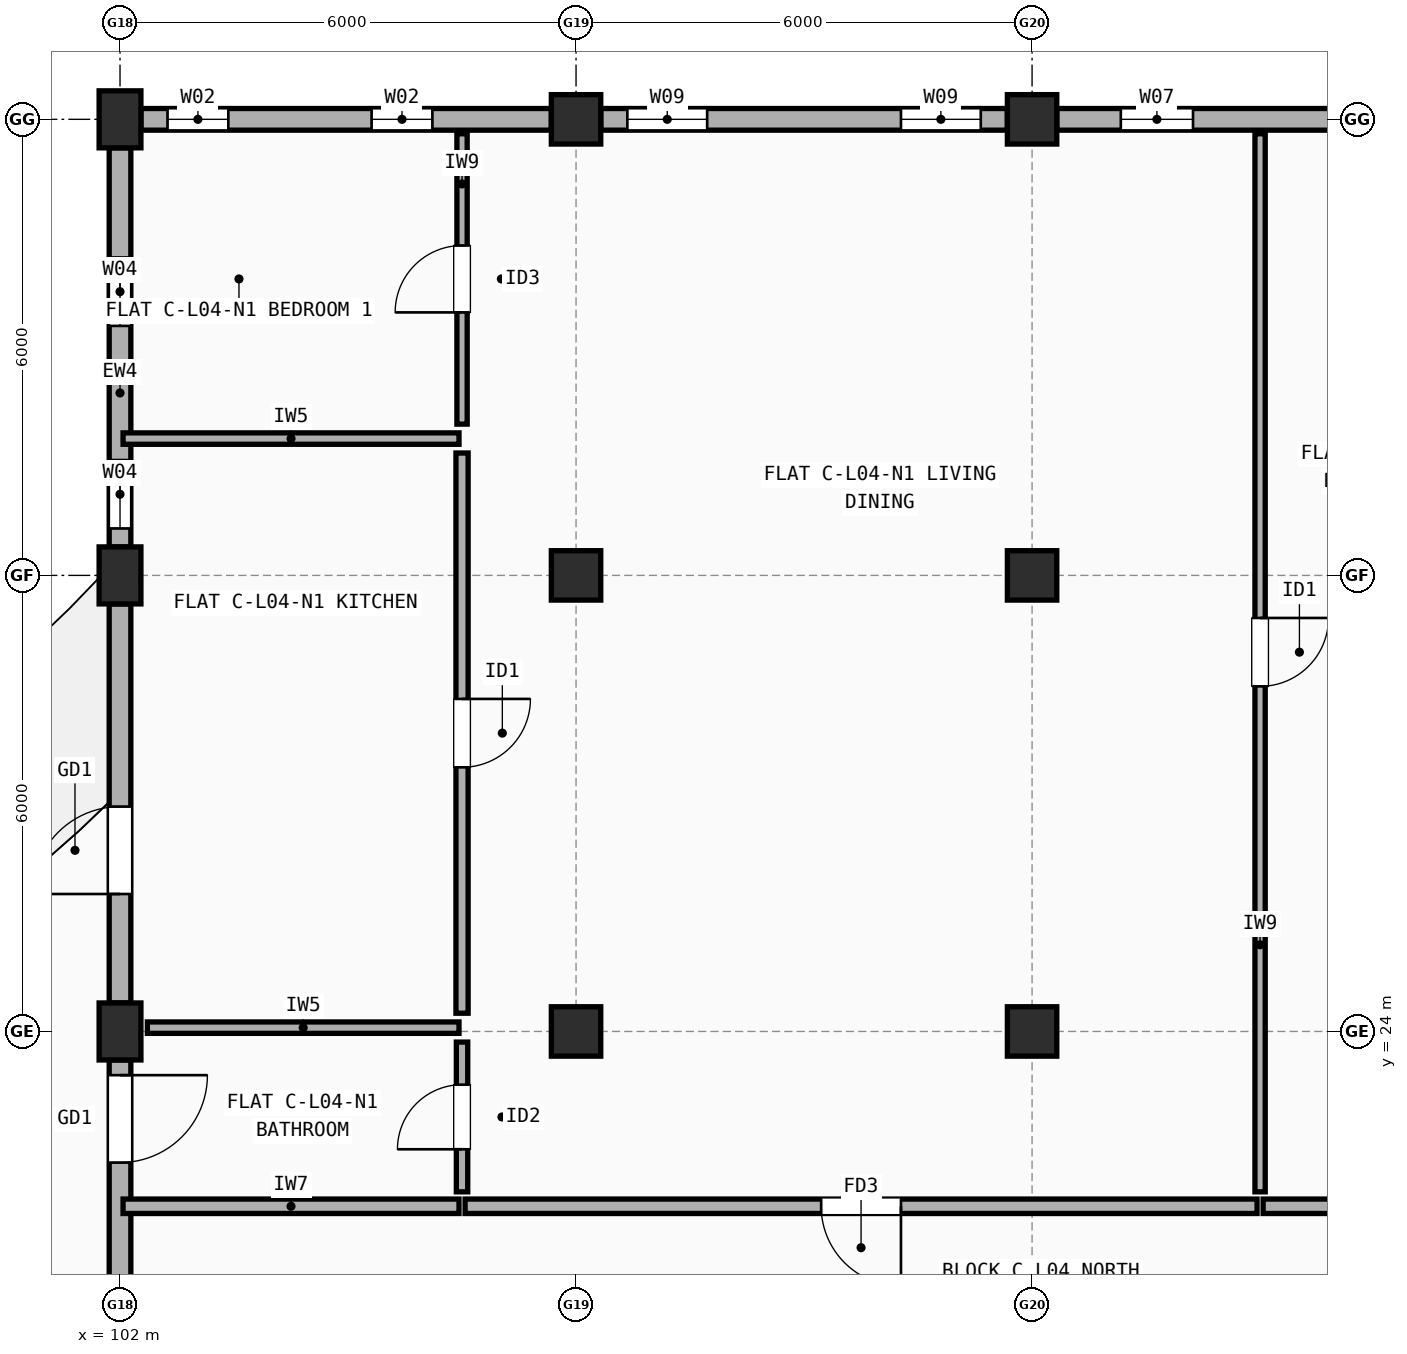
"""IFC4 building model, lengths in metres.
Left out: names, types, materials, properties, quantities, classifications, styles, units other than length and angle.
Written with IfcOpenShell. Run it as: python <this file> out.ifc"""

import sys

from ifc_helpers import new_model, si_unit, direction, frame, frame_2d, origin, origin_2d, place, context, subcontext, project, spatial, rectangle, extrude, element, fill, save


model = new_model("IFC4")
c1 = context("Model", 3, precision=1e-05, world=origin(), true_north=direction((0.0, 1.0)))
c2 = subcontext(c1, "Body", "Model", "MODEL_VIEW")
j1 = project(units=[si_unit("LENGTHUNIT", "METRE"), si_unit("PLANEANGLEUNIT", "RADIAN")], contexts=[c1])
p1 = place(None, origin())
s1 = spatial("IfcSite", under=j1, at=p1, CompositionType="ELEMENT")
p2 = place(p1, origin())
s2 = spatial("IfcBuilding", under=s1, at=p2, CompositionType="ELEMENT")
p3 = place(p2, frame((0.0, 0.0, 14.1)))
s3 = spatial("IfcBuildingStorey", under=s2, at=p3, CompositionType="ELEMENT", Elevation=14.1)
for number, where, z_axis, x_axis in (
    (1, (102.0, 24.0, 0.0), (0.0, 0.0, 1.0), (1.0, 0.0, 0.0)),
    (2, (102.0, 30.0, 0.0), (0.0, 0.0, 1.0), (1.0, 0.0, 0.0)),
    (3, (102.0, 36.0, 0.0), (0.0, 0.0, 1.0), (1.0, 0.0, 0.0)),
):
    element("IfcColumn", number, at=place(p3, frame(where, z_axis=z_axis, x_axis=x_axis)), inside=s3, PredefinedType="COLUMN", context=c2, shape_type="SweptSolid", body=[
        extrude(rectangle(XDim=0.55, YDim=0.75, at=origin_2d()), origin(), (0.0, 0.0, 1.0), 2.95),
    ])
for number, where, z_axis, x_axis in (
    (4, (108.0, 24.0, 0.0), (0.0, 0.0, 1.0), (1.0, 0.0, 0.0)),
    (5, (108.0, 30.0, 0.0), (0.0, 0.0, 1.0), (1.0, 0.0, 0.0)),
    (6, (108.0, 36.0, 0.0), (0.0, 0.0, 1.0), (1.0, 0.0, 0.0)),
    (7, (114.0, 24.0, 0.0), (0.0, 0.0, 1.0), (1.0, 0.0, 0.0)),
    (8, (114.0, 30.0, 0.0), (0.0, 0.0, 1.0), (1.0, 0.0, 0.0)),
    (9, (114.0, 36.0, 0.0), (0.0, 0.0, 1.0), (1.0, 0.0, 0.0)),
):
    element("IfcColumn", number, at=place(p3, frame(where, z_axis=z_axis, x_axis=x_axis)), inside=s3, PredefinedType="COLUMN", context=c2, shape_type="SweptSolid", body=[
        extrude(rectangle(XDim=0.65, YDim=0.65, at=origin_2d()), origin(), (0.0, 0.0, 1.0), 2.95),
    ])
p4 = place(p3, frame((119.675, 36.0, 0.0), z_axis=(0.0, 0.0, 1.0), x_axis=(-1.0, 0.0, 0.0)))
e10 = element("IfcWall", 10, at=p4, inside=s3, PredefinedType="STANDARD", context=c2, shape_type="SweptSolid", body=[
    extrude(rectangle(XDim=5.35, YDim=0.285, at=frame_2d((2.675, 0.0))), origin(), (0.0, 0.0, 1.0), 2.432),
])
p5 = place(p4, frame((0.867, 0.0, 0.9)))
e11 = element("IfcOpeningElement", 11, at=p5, cuts=e10, PredefinedType="OPENING", context=c2, shape_type="SweptSolid", body=[
    extrude(rectangle(XDim=0.9, YDim=1.3, at=frame_2d((0.45, 0.65))), frame((0.0, 0.152, 0.0), z_axis=(0.0, -1.0, 0.0), x_axis=(1.0, 0.0, 0.0)), (0.0, 0.0, 1.0), 0.305),
])
p6 = place(p4, frame((3.558, 0.0, 0.9)))
e12 = element("IfcOpeningElement", 12, at=p6, cuts=e10, PredefinedType="OPENING", context=c2, shape_type="SweptSolid", body=[
    extrude(rectangle(XDim=0.95, YDim=1.35, at=frame_2d((0.475, 0.675))), frame((0.0, 0.152, 0.0), z_axis=(0.0, -1.0, 0.0), x_axis=(1.0, 0.0, 0.0)), (0.0, 0.0, 1.0), 0.305),
])
p7 = place(p3, frame((113.675, 36.0, 0.0), z_axis=(0.0, 0.0, 1.0), x_axis=(-1.0, 0.0, 0.0)))
e13 = element("IfcWall", 13, at=p7, inside=s3, PredefinedType="STANDARD", context=c2, shape_type="SweptSolid", body=[
    extrude(rectangle(XDim=5.35, YDim=0.285, at=frame_2d((2.675, 0.0))), origin(), (0.0, 0.0, 1.0), 2.432),
])
p8 = place(p7, frame((0.35, 0.0, 0.9)))
e14 = element("IfcOpeningElement", 14, at=p8, cuts=e13, PredefinedType="OPENING", context=c2, shape_type="SweptSolid", body=[
    extrude(rectangle(XDim=1.05, YDim=1.35, at=frame_2d((0.525, 0.675))), frame((0.0, 0.152, 0.0), z_axis=(0.0, -1.0, 0.0), x_axis=(1.0, 0.0, 0.0)), (0.0, 0.0, 1.0), 0.305),
])
p9 = place(p7, frame((3.95, 0.0, 0.9)))
e15 = element("IfcOpeningElement", 15, at=p9, cuts=e13, PredefinedType="OPENING", context=c2, shape_type="SweptSolid", body=[
    extrude(rectangle(XDim=1.05, YDim=1.35, at=frame_2d((0.525, 0.675))), frame((0.0, 0.152, 0.0), z_axis=(0.0, -1.0, 0.0), x_axis=(1.0, 0.0, 0.0)), (0.0, 0.0, 1.0), 0.305),
])
p10 = place(p3, frame((107.675, 36.0, 0.0), z_axis=(0.0, 0.0, 1.0), x_axis=(-1.0, 0.0, 0.0)))
e16 = element("IfcWall", 16, at=p10, inside=s3, PredefinedType="STANDARD", context=c2, shape_type="SweptSolid", body=[
    extrude(rectangle(XDim=5.4, YDim=0.285, at=frame_2d((2.7, 0.0))), origin(), (0.0, 0.0, 1.0), 2.432),
])
p11 = place(p10, frame((1.565, 0.0, 0.9)))
e17 = element("IfcOpeningElement", 17, at=p11, cuts=e16, PredefinedType="OPENING", context=c2, shape_type="SweptSolid", body=[
    extrude(rectangle(XDim=0.8, YDim=1.2, at=frame_2d((0.4, 0.6))), frame((0.0, 0.152, 0.0), z_axis=(0.0, -1.0, 0.0), x_axis=(1.0, 0.0, 0.0)), (0.0, 0.0, 1.0), 0.305),
])
p12 = place(p10, frame((4.25, 0.0, 0.9)))
e18 = element("IfcOpeningElement", 18, at=p12, cuts=e16, PredefinedType="OPENING", context=c2, shape_type="SweptSolid", body=[
    extrude(rectangle(XDim=0.8, YDim=1.2, at=frame_2d((0.4, 0.6))), frame((0.0, 0.152, 0.0), z_axis=(0.0, -1.0, 0.0), x_axis=(1.0, 0.0, 0.0)), (0.0, 0.0, 1.0), 0.305),
])
p13 = place(p3, frame((102.0, 35.625, 0.0), z_axis=(0.0, 0.0, 1.0), x_axis=(0.0, -1.0, 0.0)))
e19 = element("IfcWall", 19, at=p13, inside=s3, PredefinedType="STANDARD", context=c2, shape_type="SweptSolid", body=[
    extrude(rectangle(XDim=5.25, YDim=0.285, at=frame_2d((2.625, 0.0))), origin(), (0.0, 0.0, 1.0), 2.432),
])
p14 = place(p13, frame((1.442, 0.0, 0.9)))
e20 = element("IfcOpeningElement", 20, at=p14, cuts=e19, PredefinedType="OPENING", context=c2, shape_type="SweptSolid", body=[
    extrude(rectangle(XDim=0.9, YDim=1.3, at=frame_2d((0.45, 0.65))), frame((0.0, 0.152, 0.0), z_axis=(0.0, -1.0, 0.0), x_axis=(1.0, 0.0, 0.0)), (0.0, 0.0, 1.0), 0.305),
])
p15 = place(p13, frame((4.107, 0.0, 0.9)))
e21 = element("IfcOpeningElement", 21, at=p15, cuts=e19, PredefinedType="OPENING", context=c2, shape_type="SweptSolid", body=[
    extrude(rectangle(XDim=0.9, YDim=1.3, at=frame_2d((0.45, 0.65))), frame((0.0, 0.152, 0.0), z_axis=(0.0, -1.0, 0.0), x_axis=(1.0, 0.0, 0.0)), (0.0, 0.0, 1.0), 0.305),
])
p16 = place(p3, frame((102.0, 29.625, 0.0), z_axis=(0.0, 0.0, 1.0), x_axis=(0.0, -1.0, 0.0)))
e22 = element("IfcWall", 22, at=p16, inside=s3, PredefinedType="STANDARD", context=c2, shape_type="SweptSolid", body=[
    extrude(rectangle(XDim=5.25, YDim=0.285, at=frame_2d((2.625, 0.0))), origin(), (0.0, 0.0, 1.0), 2.432),
])
p17 = place(p16, frame((2.667, 0.0, 0.0)))
e23 = element("IfcOpeningElement", 23, at=p17, cuts=e22, PredefinedType="OPENING", context=c2, shape_type="SweptSolid", body=[
    extrude(rectangle(XDim=1.15, YDim=2.15, at=frame_2d((0.575, 1.075))), frame((0.0, 0.152, 0.0), z_axis=(0.0, -1.0, 0.0), x_axis=(1.0, 0.0, 0.0)), (0.0, 0.0, 1.0), 0.305),
])
p18 = place(p3, frame((102.0, 23.625, 0.0), z_axis=(0.0, 0.0, 1.0), x_axis=(0.0, -1.0, 0.0)))
e24 = element("IfcWall", 24, at=p18, inside=s3, PredefinedType="STANDARD", context=c2, shape_type="SweptSolid", body=[
    extrude(rectangle(XDim=5.25, YDim=0.285, at=frame_2d((2.625, 0.0))), origin(), (0.0, 0.0, 1.0), 2.432),
])
p19 = place(p18, frame((0.2, 0.0, 0.0)))
e25 = element("IfcOpeningElement", 25, at=p19, cuts=e24, PredefinedType="OPENING", context=c2, shape_type="SweptSolid", body=[
    extrude(rectangle(XDim=1.15, YDim=2.15, at=frame_2d((0.575, 1.075))), frame((0.0, 0.152, 0.0), z_axis=(0.0, -1.0, 0.0), x_axis=(1.0, 0.0, 0.0)), (0.0, 0.0, 1.0), 0.305),
])
p20 = place(p18, frame((3.083, 0.0, 0.9)))
e26 = element("IfcOpeningElement", 26, at=p20, cuts=e24, PredefinedType="OPENING", context=c2, shape_type="SweptSolid", body=[
    extrude(rectangle(XDim=1.05, YDim=1.35, at=frame_2d((0.525, 0.675))), frame((0.0, 0.152, 0.0), z_axis=(0.0, -1.0, 0.0), x_axis=(1.0, 0.0, 0.0)), (0.0, 0.0, 1.0), 0.305),
])
p21 = place(p3, frame((102.04, 21.7, 0.0), z_axis=(0.0, 0.0, 1.0), x_axis=(1.0, 0.0, 0.0)))
e27 = element("IfcWall", 27, at=p21, inside=s3, PredefinedType="SOLIDWALL", context=c2, shape_type="SweptSolid", body=[
    extrude(rectangle(XDim=4.42, YDim=0.19, at=frame_2d((2.21, 0.0))), origin(), (0.0, 0.0, 1.0), 2.432),
])
p22 = place(p3, frame((106.54, 21.7, 0.0), z_axis=(0.0, 0.0, 1.0), x_axis=(1.0, 0.0, 0.0)))
e28 = element("IfcWall", 28, at=p22, inside=s3, PredefinedType="SOLIDWALL", context=c2, shape_type="SweptSolid", body=[
    extrude(rectangle(XDim=10.42, YDim=0.19, at=frame_2d((5.21, 0.0))), origin(), (0.0, 0.0, 1.0), 2.508),
])
p23 = place(p22, frame((4.685, 0.0, 0.0)))
e29 = element("IfcOpeningElement", 29, at=p23, cuts=e28, PredefinedType="OPENING", context=c2, shape_type="SweptSolid", body=[
    extrude(rectangle(XDim=1.05, YDim=2.15, at=frame_2d((0.525, 1.075))), frame((0.0, 0.105, 0.0), z_axis=(0.0, -1.0, 0.0), x_axis=(1.0, 0.0, 0.0)), (0.0, 0.0, 1.0), 0.21),
])
p24 = place(p3, frame((106.5, 31.99, 0.0), z_axis=(0.0, 0.0, 1.0), x_axis=(0.0, 1.0, 0.0)))
e30 = element("IfcWall", 30, at=p24, inside=s3, PredefinedType="PARTITIONING", context=c2, shape_type="SweptSolid", body=[
    extrude(rectangle(XDim=3.82, YDim=0.135, at=frame_2d((1.91, 0.0))), origin(), (0.0, 0.0, 1.0), 2.95),
])
p25 = place(p24, frame((1.47, 0.0, 0.0)))
e31 = element("IfcOpeningElement", 31, at=p25, cuts=e30, PredefinedType="OPENING", context=c2, shape_type="SweptSolid", body=[
    extrude(rectangle(XDim=0.88, YDim=2.1, at=frame_2d((0.44, 1.05))), frame((0.0, 0.077, 0.0), z_axis=(0.0, -1.0, 0.0), x_axis=(1.0, 0.0, 0.0)), (0.0, 0.0, 1.0), 0.155),
])
p26 = place(p3, frame((106.5, 24.24, 0.0), z_axis=(0.0, 0.0, 1.0), x_axis=(0.0, 1.0, 0.0)))
e32 = element("IfcWall", 32, at=p26, inside=s3, PredefinedType="PLUMBINGWALL", context=c2, shape_type="SweptSolid", body=[
    extrude(rectangle(XDim=7.37, YDim=0.16, at=frame_2d((3.685, 0.0))), origin(), (0.0, 0.0, 1.0), 2.432),
])
p27 = place(p26, frame((3.235, 0.0, 0.0)))
e33 = element("IfcOpeningElement", 33, at=p27, cuts=e32, PredefinedType="OPENING", context=c2, shape_type="SweptSolid", body=[
    extrude(rectangle(XDim=0.9, YDim=2.1, at=frame_2d((0.45, 1.05))), frame((0.0, 0.09, 0.0), z_axis=(0.0, -1.0, 0.0), x_axis=(1.0, 0.0, 0.0)), (0.0, 0.0, 1.0), 0.18),
])
p28 = place(p3, frame((106.5, 21.89, 0.0), z_axis=(0.0, 0.0, 1.0), x_axis=(0.0, 1.0, 0.0)))
e34 = element("IfcWall", 34, at=p28, inside=s3, PredefinedType="PARTITIONING", context=c2, shape_type="SweptSolid", body=[
    extrude(rectangle(XDim=1.97, YDim=0.15, at=frame_2d((0.985, 0.0))), origin(), (0.0, 0.0, 1.0), 2.95),
])
p29 = place(p28, frame((0.56, 0.0, 0.0)))
e35 = element("IfcOpeningElement", 35, at=p29, cuts=e34, PredefinedType="OPENING", context=c2, shape_type="SweptSolid", body=[
    extrude(rectangle(XDim=0.85, YDim=2.1, at=frame_2d((0.425, 1.05))), frame((0.0, 0.085, 0.0), z_axis=(0.0, -1.0, 0.0), x_axis=(1.0, 0.0, 0.0)), (0.0, 0.0, 1.0), 0.17),
])
p30 = place(p3, frame((102.04, 31.8, 0.0), z_axis=(0.0, 0.0, 1.0), x_axis=(1.0, 0.0, 0.0)))
e36 = element("IfcWall", 36, at=p30, inside=s3, PredefinedType="PARTITIONING", context=c2, shape_type="SweptSolid", body=[
    extrude(rectangle(XDim=4.42, YDim=0.15, at=frame_2d((2.21, 0.0))), origin(), (0.0, 0.0, 1.0), 2.432),
])
p31 = place(p3, frame((102.36, 24.05, 0.0), z_axis=(0.0, 0.0, 1.0), x_axis=(1.0, 0.0, 0.0)))
e37 = element("IfcWall", 37, at=p31, inside=s3, PredefinedType="PARTITIONING", context=c2, shape_type="SweptSolid", body=[
    extrude(rectangle(XDim=4.1, YDim=0.15, at=frame_2d((2.05, 0.0))), origin(), (0.0, 0.0, 1.0), 2.508),
])
p32 = place(p3, frame((117.04, 21.7, 0.0), z_axis=(0.0, 0.0, 1.0), x_axis=(1.0, 0.0, 0.0)))
e38 = element("IfcWall", 38, at=p32, inside=s3, PredefinedType="SOLIDWALL", context=c2, shape_type="SweptSolid", body=[
    extrude(rectangle(XDim=2.92, YDim=0.19, at=frame_2d((1.46, 0.0))), origin(), (0.0, 0.0, 1.0), 2.95),
])
p33 = place(p3, frame((117.0, 21.89, 0.0), z_axis=(0.0, 0.0, 1.0), x_axis=(0.0, 1.0, 0.0)))
e39 = element("IfcWall", 39, at=p33, inside=s3, PredefinedType="PARTITIONING", context=c2, shape_type="SweptSolid", body=[
    extrude(rectangle(XDim=13.92, YDim=0.135, at=frame_2d((6.96, 0.0))), origin(), (0.0, 0.0, 1.0), 2.432),
])
p34 = place(p33, frame((6.65, 0.0, 0.0)))
e40 = element("IfcOpeningElement", 40, at=p34, cuts=e39, PredefinedType="OPENING", context=c2, shape_type="SweptSolid", body=[
    extrude(rectangle(XDim=0.9, YDim=2.1, at=frame_2d((0.45, 1.05))), frame((0.0, 0.077, 0.0), z_axis=(0.0, -1.0, 0.0), x_axis=(1.0, 0.0, 0.0)), (0.0, 0.0, 1.0), 0.155),
])
p35 = place(p6, origin())
e41 = element("IfcWindow", 41, at=p35, inside=s3, PartitioningType="SINGLE_PANEL", PredefinedType="WINDOW", context=c2, shape_type="SweptSolid", body=[
    extrude(rectangle(XDim=0.95, YDim=1.35, at=frame_2d((0.475, 0.675))), frame((0.0, 0.03, 0.0), z_axis=(0.0, -1.0, 0.0), x_axis=(1.0, 0.0, 0.0)), (0.0, 0.0, 1.0), 0.06),
])
fill(e12, e41)
p36 = place(p8, origin())
e42 = element("IfcWindow", 42, at=p36, inside=s3, PartitioningType="SINGLE_PANEL", PredefinedType="WINDOW", context=c2, shape_type="SweptSolid", body=[
    extrude(rectangle(XDim=1.05, YDim=1.35, at=frame_2d((0.525, 0.675))), frame((0.0, 0.03, 0.0), z_axis=(0.0, -1.0, 0.0), x_axis=(1.0, 0.0, 0.0)), (0.0, 0.0, 1.0), 0.06),
])
fill(e14, e42)
p37 = place(p9, origin())
e43 = element("IfcWindow", 43, at=p37, inside=s3, PartitioningType="SINGLE_PANEL", PredefinedType="WINDOW", context=c2, shape_type="SweptSolid", body=[
    extrude(rectangle(XDim=1.05, YDim=1.35, at=frame_2d((0.525, 0.675))), frame((0.0, 0.03, 0.0), z_axis=(0.0, -1.0, 0.0), x_axis=(1.0, 0.0, 0.0)), (0.0, 0.0, 1.0), 0.06),
])
fill(e15, e43)
p38 = place(p11, origin())
e44 = element("IfcWindow", 44, at=p38, inside=s3, PartitioningType="SINGLE_PANEL", PredefinedType="WINDOW", context=c2, shape_type="SweptSolid", body=[
    extrude(rectangle(XDim=0.8, YDim=1.2, at=frame_2d((0.4, 0.6))), frame((0.0, 0.03, 0.0), z_axis=(0.0, -1.0, 0.0), x_axis=(1.0, 0.0, 0.0)), (0.0, 0.0, 1.0), 0.06),
])
fill(e17, e44)
p39 = place(p12, origin())
e45 = element("IfcWindow", 45, at=p39, inside=s3, PartitioningType="SINGLE_PANEL", PredefinedType="WINDOW", context=c2, shape_type="SweptSolid", body=[
    extrude(rectangle(XDim=0.8, YDim=1.2, at=frame_2d((0.4, 0.6))), frame((0.0, 0.03, 0.0), z_axis=(0.0, -1.0, 0.0), x_axis=(1.0, 0.0, 0.0)), (0.0, 0.0, 1.0), 0.06),
])
fill(e18, e45)
p40 = place(p14, origin())
e46 = element("IfcWindow", 46, at=p40, inside=s3, PartitioningType="SINGLE_PANEL", PredefinedType="WINDOW", context=c2, shape_type="SweptSolid", body=[
    extrude(rectangle(XDim=0.9, YDim=1.3, at=frame_2d((0.45, 0.65))), frame((0.0, 0.03, 0.0), z_axis=(0.0, -1.0, 0.0), x_axis=(1.0, 0.0, 0.0)), (0.0, 0.0, 1.0), 0.06),
])
fill(e20, e46)
p41 = place(p15, origin())
e47 = element("IfcWindow", 47, at=p41, inside=s3, PartitioningType="SINGLE_PANEL", PredefinedType="WINDOW", context=c2, shape_type="SweptSolid", body=[
    extrude(rectangle(XDim=0.9, YDim=1.3, at=frame_2d((0.45, 0.65))), frame((0.0, 0.03, 0.0), z_axis=(0.0, -1.0, 0.0), x_axis=(1.0, 0.0, 0.0)), (0.0, 0.0, 1.0), 0.06),
])
fill(e21, e47)
p42 = place(p17, frame((1.15, 0.0, 0.0), z_axis=(0.0, 0.0, 1.0), x_axis=(-1.0, 0.0, 0.0)))
e48 = element("IfcDoor", 48, at=p42, inside=s3, OperationType="SINGLE_SWING_RIGHT", PredefinedType="DOOR", context=c2, shape_type="SweptSolid", body=[
    extrude(rectangle(XDim=1.15, YDim=2.15, at=frame_2d((0.575, 1.075))), frame((0.0, 0.025, 0.0), z_axis=(0.0, -1.0, 0.0), x_axis=(1.0, 0.0, 0.0)), (0.0, 0.0, 1.0), 0.05),
])
fill(e23, e48)
p43 = place(p19, frame((1.15, 0.0, 0.0), z_axis=(0.0, 0.0, 1.0), x_axis=(-1.0, 0.0, 0.0)))
e49 = element("IfcDoor", 49, at=p43, inside=s3, OperationType="SINGLE_SWING_LEFT", PredefinedType="DOOR", context=c2, shape_type="SweptSolid", body=[
    extrude(rectangle(XDim=1.15, YDim=2.15, at=frame_2d((0.575, 1.075))), frame((0.0, 0.025, 0.0), z_axis=(0.0, -1.0, 0.0), x_axis=(1.0, 0.0, 0.0)), (0.0, 0.0, 1.0), 0.05),
])
fill(e25, e49)
p44 = place(p23, origin())
e50 = element("IfcDoor", 50, at=p44, inside=s3, OperationType="SINGLE_SWING_RIGHT", PredefinedType="DOOR", context=c2, shape_type="SweptSolid", body=[
    extrude(rectangle(XDim=1.05, YDim=2.15, at=frame_2d((0.525, 1.075))), frame((0.0, 0.025, 0.0), z_axis=(0.0, -1.0, 0.0), x_axis=(1.0, 0.0, 0.0)), (0.0, 0.0, 1.0), 0.05),
])
fill(e29, e50)
p45 = place(p25, origin())
e51 = element("IfcDoor", 51, at=p45, inside=s3, OperationType="SINGLE_SWING_LEFT", PredefinedType="DOOR", context=c2, shape_type="SweptSolid", body=[
    extrude(rectangle(XDim=0.88, YDim=2.1, at=frame_2d((0.44, 1.05))), frame((0.0, 0.025, 0.0), z_axis=(0.0, -1.0, 0.0), x_axis=(1.0, 0.0, 0.0)), (0.0, 0.0, 1.0), 0.05),
])
fill(e31, e51)
p46 = place(p27, origin())
e52 = element("IfcDoor", 52, at=p46, inside=s3, OperationType="SINGLE_SWING_RIGHT", PredefinedType="DOOR", context=c2, shape_type="SweptSolid", body=[
    extrude(rectangle(XDim=0.9, YDim=2.1, at=frame_2d((0.45, 1.05))), frame((0.0, 0.025, 0.0), z_axis=(0.0, -1.0, 0.0), x_axis=(1.0, 0.0, 0.0)), (0.0, 0.0, 1.0), 0.05),
])
fill(e33, e52)
p47 = place(p29, origin())
e53 = element("IfcDoor", 53, at=p47, inside=s3, OperationType="SINGLE_SWING_LEFT", PredefinedType="DOOR", context=c2, shape_type="SweptSolid", body=[
    extrude(rectangle(XDim=0.85, YDim=2.1, at=frame_2d((0.425, 1.05))), frame((0.0, 0.025, 0.0), z_axis=(0.0, -1.0, 0.0), x_axis=(1.0, 0.0, 0.0)), (0.0, 0.0, 1.0), 0.05),
])
fill(e35, e53)
p48 = place(p34, origin())
e54 = element("IfcDoor", 54, at=p48, inside=s3, OperationType="SINGLE_SWING_RIGHT", PredefinedType="DOOR", context=c2, shape_type="SweptSolid", body=[
    extrude(rectangle(XDim=0.9, YDim=2.1, at=frame_2d((0.45, 1.05))), frame((0.0, 0.025, 0.0), z_axis=(0.0, -1.0, 0.0), x_axis=(1.0, 0.0, 0.0)), (0.0, 0.0, 1.0), 0.05),
])
fill(e40, e54)
save(model, sys.argv[1])
